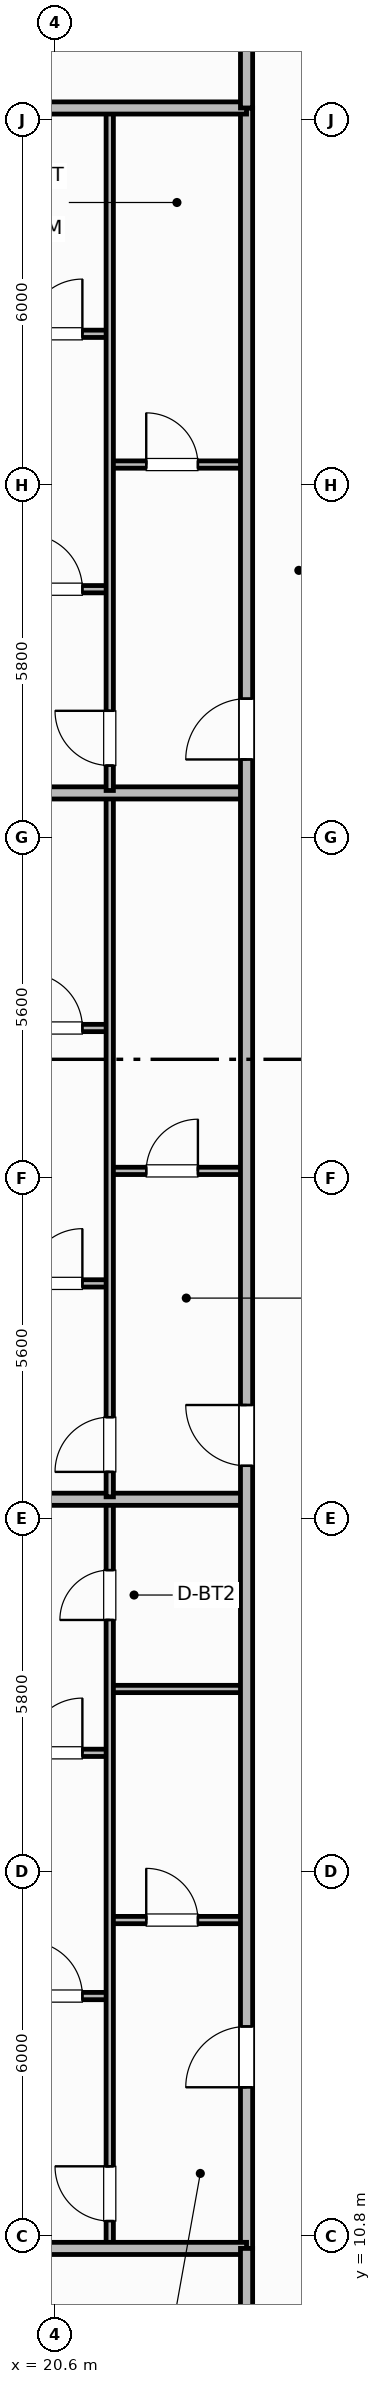
"""IFC4 building model, lengths in metres.
Left out: names, types, materials, properties, quantities, classifications, styles, units other than length and angle.
Written with IfcOpenShell. Run it as: python <this file> out.ifc"""

import sys

from ifc_helpers import new_model, si_unit, direction, frame, frame_2d, origin, place, context, subcontext, project, spatial, rectangle, extrude, element, fill, save


model = new_model("IFC4")
c1 = context("Model", 3, precision=1e-05, world=origin(), true_north=direction((0.0, 1.0)))
c2 = subcontext(c1, "Body", "Model", "MODEL_VIEW")
j1 = project(units=[si_unit("LENGTHUNIT", "METRE"), si_unit("PLANEANGLEUNIT", "RADIAN")], contexts=[c1])
p1 = place(None, origin())
s1 = spatial("IfcSite", under=j1, at=p1, CompositionType="ELEMENT")
p2 = place(p1, origin())
s2 = spatial("IfcBuilding", under=s1, at=p2, CompositionType="ELEMENT")
p3 = place(p2, frame((0.0, 0.0, 106.8)))
s3 = spatial("IfcBuildingStorey", under=s2, at=p3, CompositionType="ELEMENT", Elevation=106.8)
p4 = place(p3, frame((21.5, 16.0, 0.0), z_axis=(0.0, 0.0, 1.0), x_axis=(1.0, 0.0, 0.0)))
e1 = element("IfcWall", 1, at=p4, inside=s3, PredefinedType="PARTITIONING", context=c2, shape_type="SweptSolid", body=[
    extrude(rectangle(XDim=2.25, YDim=0.12, at=frame_2d((1.125, 0.0))), origin(), (0.0, 0.0, 1.0), 2.53),
])
p5 = place(p4, frame((0.6, 0.0, 0.0)))
e2 = element("IfcOpeningElement", 2, at=p5, cuts=e1, PredefinedType="OPENING", context=c2, shape_type="SweptSolid", body=[
    extrude(rectangle(XDim=0.85, YDim=2.1, at=frame_2d((0.425, 1.05))), frame((0.0, 0.07, 0.0), z_axis=(0.0, -1.0, 0.0), x_axis=(1.0, 0.0, 0.0)), (0.0, 0.0, 1.0), 0.14),
])
p6 = place(p3, frame((21.5, 19.8, 0.0), z_axis=(0.0, 0.0, 1.0), x_axis=(1.0, 0.0, 0.0)))
e3 = element("IfcWall", 3, at=p6, inside=s3, PredefinedType="PARTITIONING", context=c2, shape_type="SweptSolid", body=[
    extrude(rectangle(XDim=2.25, YDim=0.12, at=frame_2d((1.125, 0.0))), origin(), (0.0, 0.0, 1.0), 2.53),
])
p7 = place(p3, frame((14.57, 14.75, 0.0), z_axis=(0.0, 0.0, 1.0), x_axis=(1.0, 0.0, 0.0)))
e4 = element("IfcWall", 4, at=p7, inside=s3, PredefinedType="PARTITIONING", context=c2, shape_type="SweptSolid", body=[
    extrude(rectangle(XDim=6.93, YDim=0.12, at=frame_2d((3.465, 0.0))), origin(), (0.0, 0.0, 1.0), 2.53),
])
p8 = place(p7, frame((5.58, 0.0, 0.0)))
e5 = element("IfcOpeningElement", 5, at=p8, cuts=e4, PredefinedType="OPENING", context=c2, shape_type="SweptSolid", body=[
    extrude(rectangle(XDim=0.9, YDim=2.1, at=frame_2d((0.45, 1.05))), frame((0.0, 0.07, 0.0), z_axis=(0.0, -1.0, 0.0), x_axis=(1.0, 0.0, 0.0)), (0.0, 0.0, 1.0), 0.14),
])
p9 = place(p3, frame((14.57, 18.75, 0.0), z_axis=(0.0, 0.0, 1.0), x_axis=(1.0, 0.0, 0.0)))
e6 = element("IfcWall", 6, at=p9, inside=s3, PredefinedType="PARTITIONING", context=c2, shape_type="SweptSolid", body=[
    extrude(rectangle(XDim=6.93, YDim=0.12, at=frame_2d((3.465, 0.0))), origin(), (0.0, 0.0, 1.0), 2.53),
])
p10 = place(p9, frame((5.58, 0.0, 0.0)))
e7 = element("IfcOpeningElement", 7, at=p10, cuts=e6, PredefinedType="OPENING", context=c2, shape_type="SweptSolid", body=[
    extrude(rectangle(XDim=0.9, YDim=2.1, at=frame_2d((0.45, 1.05))), frame((0.0, 0.07, 0.0), z_axis=(0.0, -1.0, 0.0), x_axis=(1.0, 0.0, 0.0)), (0.0, 0.0, 1.0), 0.14),
])
p11 = place(p3, frame((21.5, 10.64, 0.0), z_axis=(0.0, 0.0, 1.0), x_axis=(0.0, 1.0, 0.0)))
e8 = element("IfcWall", 8, at=p11, inside=s3, PredefinedType="PARTITIONING", context=c2, shape_type="SweptSolid", body=[
    extrude(rectangle(XDim=12.24, YDim=0.12, at=frame_2d((6.12, 0.0))), origin(), (0.0, 0.0, 1.0), 2.53),
])
p12 = place(p11, frame((0.41, 0.0, 0.0)))
e9 = element("IfcOpeningElement", 9, at=p12, cuts=e8, PredefinedType="OPENING", context=c2, shape_type="SweptSolid", body=[
    extrude(rectangle(XDim=0.9, YDim=2.1, at=frame_2d((0.45, 1.05))), frame((0.0, 0.07, 0.0), z_axis=(0.0, -1.0, 0.0), x_axis=(1.0, 0.0, 0.0)), (0.0, 0.0, 1.0), 0.14),
])
p13 = place(p11, frame((10.295, 0.0, 0.0)))
e10 = element("IfcOpeningElement", 10, at=p13, cuts=e8, PredefinedType="OPENING", context=c2, shape_type="SweptSolid", body=[
    extrude(rectangle(XDim=0.82, YDim=2.08, at=frame_2d((0.41, 1.04))), frame((0.0, 0.07, 0.0), z_axis=(0.0, -1.0, 0.0), x_axis=(1.0, 0.0, 0.0)), (0.0, 0.0, 1.0), 0.14),
])
p14 = place(p3, frame((14.57, 22.92, 0.0), z_axis=(0.0, 0.0, 1.0), x_axis=(1.0, 0.0, 0.0)))
e11 = element("IfcWall", 11, at=p14, inside=s3, PredefinedType="PARTITIONING", context=c2, shape_type="SweptSolid", body=[
    extrude(rectangle(XDim=9.18, YDim=0.2, at=frame_2d((4.59, 0.0))), origin(), (0.0, 0.0, 1.0), 2.53),
])
p15 = place(p3, frame((21.5, 28.32, 0.0), z_axis=(0.0, 0.0, 1.0), x_axis=(1.0, 0.0, 0.0)))
e12 = element("IfcWall", 12, at=p15, inside=s3, PredefinedType="PARTITIONING", context=c2, shape_type="SweptSolid", body=[
    extrude(rectangle(XDim=2.25, YDim=0.12, at=frame_2d((1.125, 0.0))), origin(), (0.0, 0.0, 1.0), 2.53),
])
p16 = place(p15, frame((0.6, 0.0, 0.0)))
e13 = element("IfcOpeningElement", 13, at=p16, cuts=e12, PredefinedType="OPENING", context=c2, shape_type="SweptSolid", body=[
    extrude(rectangle(XDim=0.85, YDim=2.1, at=frame_2d((0.425, 1.05))), frame((0.0, 0.07, 0.0), z_axis=(0.0, -1.0, 0.0), x_axis=(1.0, 0.0, 0.0)), (0.0, 0.0, 1.0), 0.14),
])
p17 = place(p3, frame((15.434, 26.47, 0.0), z_axis=(0.0, 0.0, 1.0), x_axis=(1.0, 0.0, 0.0)))
e14 = element("IfcWall", 14, at=p17, inside=s3, PredefinedType="PARTITIONING", context=c2, shape_type="SweptSolid", body=[
    extrude(rectangle(XDim=6.066, YDim=0.12, at=frame_2d((3.033, 0.0))), origin(), (0.0, 0.0, 1.0), 2.53),
])
p18 = place(p17, frame((4.716, 0.0, 0.0)))
e15 = element("IfcOpeningElement", 15, at=p18, cuts=e14, PredefinedType="OPENING", context=c2, shape_type="SweptSolid", body=[
    extrude(rectangle(XDim=0.9, YDim=2.1, at=frame_2d((0.45, 1.05))), frame((0.0, 0.07, 0.0), z_axis=(0.0, -1.0, 0.0), x_axis=(1.0, 0.0, 0.0)), (0.0, 0.0, 1.0), 0.14),
])
p19 = place(p3, frame((15.71, 30.67, 0.0), z_axis=(0.0, 0.0, 1.0), x_axis=(1.0, 0.0, 0.0)))
e16 = element("IfcWall", 16, at=p19, inside=s3, PredefinedType="PARTITIONING", context=c2, shape_type="SweptSolid", body=[
    extrude(rectangle(XDim=5.79, YDim=0.12, at=frame_2d((2.895, 0.0))), origin(), (0.0, 0.0, 1.0), 2.53),
])
p20 = place(p19, frame((4.439, 0.0, 0.0)))
e17 = element("IfcOpeningElement", 17, at=p20, cuts=e16, PredefinedType="OPENING", context=c2, shape_type="SweptSolid", body=[
    extrude(rectangle(XDim=0.9, YDim=2.1, at=frame_2d((0.45, 1.05))), frame((0.0, 0.07, 0.0), z_axis=(0.0, -1.0, 0.0), x_axis=(1.0, 0.0, 0.0)), (0.0, 0.0, 1.0), 0.14),
])
p21 = place(p3, frame((21.5, 22.96, 0.0), z_axis=(0.0, 0.0, 1.0), x_axis=(0.0, 1.0, 0.0)))
e18 = element("IfcWall", 18, at=p21, inside=s3, PredefinedType="PARTITIONING", context=c2, shape_type="SweptSolid", body=[
    extrude(rectangle(XDim=11.536, YDim=0.12, at=frame_2d((5.768, 0.0))), origin(), (0.0, 0.0, 1.0), 2.53),
])
p22 = place(p21, frame((0.41, 0.0, 0.0)))
e19 = element("IfcOpeningElement", 19, at=p22, cuts=e18, PredefinedType="OPENING", context=c2, shape_type="SweptSolid", body=[
    extrude(rectangle(XDim=0.9, YDim=2.1, at=frame_2d((0.45, 1.05))), frame((0.0, 0.07, 0.0), z_axis=(0.0, -1.0, 0.0), x_axis=(1.0, 0.0, 0.0)), (0.0, 0.0, 1.0), 0.14),
])
p23 = place(p3, frame((14.57, 34.536, 0.0), z_axis=(0.0, 0.0, 1.0), x_axis=(1.0, 0.0, 0.0)))
e20 = element("IfcWall", 20, at=p23, inside=s3, PredefinedType="PARTITIONING", context=c2, shape_type="SweptSolid", body=[
    extrude(rectangle(XDim=9.18, YDim=0.2, at=frame_2d((4.59, 0.0))), origin(), (0.0, 0.0, 1.0), 2.53),
])
p24 = place(p3, frame((21.5, 39.936, 0.0), z_axis=(0.0, 0.0, 1.0), x_axis=(1.0, 0.0, 0.0)))
e21 = element("IfcWall", 21, at=p24, inside=s3, PredefinedType="PARTITIONING", context=c2, shape_type="SweptSolid", body=[
    extrude(rectangle(XDim=2.25, YDim=0.12, at=frame_2d((1.125, 0.0))), origin(), (0.0, 0.0, 1.0), 2.53),
])
p25 = place(p24, frame((0.6, 0.0, 0.0)))
e22 = element("IfcOpeningElement", 22, at=p25, cuts=e21, PredefinedType="OPENING", context=c2, shape_type="SweptSolid", body=[
    extrude(rectangle(XDim=0.85, YDim=2.1, at=frame_2d((0.425, 1.05))), frame((0.0, 0.07, 0.0), z_axis=(0.0, -1.0, 0.0), x_axis=(1.0, 0.0, 0.0)), (0.0, 0.0, 1.0), 0.14),
])
p26 = place(p3, frame((14.57, 37.886, 0.0), z_axis=(0.0, 0.0, 1.0), x_axis=(1.0, 0.0, 0.0)))
e23 = element("IfcWall", 23, at=p26, inside=s3, PredefinedType="PARTITIONING", context=c2, shape_type="SweptSolid", body=[
    extrude(rectangle(XDim=6.93, YDim=0.12, at=frame_2d((3.465, 0.0))), origin(), (0.0, 0.0, 1.0), 2.53),
])
p27 = place(p26, frame((5.58, 0.0, 0.0)))
e24 = element("IfcOpeningElement", 24, at=p27, cuts=e23, PredefinedType="OPENING", context=c2, shape_type="SweptSolid", body=[
    extrude(rectangle(XDim=0.9, YDim=2.1, at=frame_2d((0.45, 1.05))), frame((0.0, 0.07, 0.0), z_axis=(0.0, -1.0, 0.0), x_axis=(1.0, 0.0, 0.0)), (0.0, 0.0, 1.0), 0.14),
])
p28 = place(p3, frame((14.57, 42.086, 0.0), z_axis=(0.0, 0.0, 1.0), x_axis=(1.0, 0.0, 0.0)))
e25 = element("IfcWall", 25, at=p28, inside=s3, PredefinedType="PARTITIONING", context=c2, shape_type="SweptSolid", body=[
    extrude(rectangle(XDim=6.93, YDim=0.12, at=frame_2d((3.465, 0.0))), origin(), (0.0, 0.0, 1.0), 2.53),
])
p29 = place(p28, frame((5.58, 0.0, 0.0)))
e26 = element("IfcOpeningElement", 26, at=p29, cuts=e25, PredefinedType="OPENING", context=c2, shape_type="SweptSolid", body=[
    extrude(rectangle(XDim=0.9, YDim=2.1, at=frame_2d((0.45, 1.05))), frame((0.0, 0.07, 0.0), z_axis=(0.0, -1.0, 0.0), x_axis=(1.0, 0.0, 0.0)), (0.0, 0.0, 1.0), 0.14),
])
p30 = place(p3, frame((21.5, 34.576, 0.0), z_axis=(0.0, 0.0, 1.0), x_axis=(0.0, 1.0, 0.0)))
e27 = element("IfcWall", 27, at=p30, inside=s3, PredefinedType="PARTITIONING", context=c2, shape_type="SweptSolid", body=[
    extrude(rectangle(XDim=11.184, YDim=0.12, at=frame_2d((5.592, 0.0))), origin(), (0.0, 0.0, 1.0), 2.53),
])
p31 = place(p30, frame((0.41, 0.0, 0.0)))
e28 = element("IfcOpeningElement", 28, at=p31, cuts=e27, PredefinedType="OPENING", context=c2, shape_type="SweptSolid", body=[
    extrude(rectangle(XDim=0.9, YDim=2.1, at=frame_2d((0.45, 1.05))), frame((0.0, 0.07, 0.0), z_axis=(0.0, -1.0, 0.0), x_axis=(1.0, 0.0, 0.0)), (0.0, 0.0, 1.0), 0.14),
])
p32 = place(p3, frame((23.75, 10.6, 0.0), z_axis=(0.0, 0.0, 1.0), x_axis=(0.0, 1.0, 0.0)))
e29 = element("IfcWall", 29, at=p32, inside=s3, PredefinedType="PARTITIONING", context=c2, shape_type="SweptSolid", body=[
    extrude(rectangle(XDim=35.2, YDim=0.2, at=frame_2d((17.6, 0.0))), origin(), (0.0, 0.0, 1.0), 2.53),
])
p33 = place(p32, frame((2.65, 0.0, 0.0)))
e30 = element("IfcOpeningElement", 30, at=p33, cuts=e29, PredefinedType="OPENING", context=c2, shape_type="SweptSolid", body=[
    extrude(rectangle(XDim=1.0, YDim=2.15, at=frame_2d((0.5, 1.075))), frame((0.0, 0.11, 0.0), z_axis=(0.0, -1.0, 0.0), x_axis=(1.0, 0.0, 0.0)), (0.0, 0.0, 1.0), 0.22),
])
p34 = place(p32, frame((12.87, 0.0, 0.0)))
e31 = element("IfcOpeningElement", 31, at=p34, cuts=e29, PredefinedType="OPENING", context=c2, shape_type="SweptSolid", body=[
    extrude(rectangle(XDim=1.0, YDim=2.15, at=frame_2d((0.5, 1.075))), frame((0.0, 0.11, 0.0), z_axis=(0.0, -1.0, 0.0), x_axis=(1.0, 0.0, 0.0)), (0.0, 0.0, 1.0), 0.22),
])
p35 = place(p32, frame((24.486, 0.0, 0.0)))
e32 = element("IfcOpeningElement", 32, at=p35, cuts=e29, PredefinedType="OPENING", context=c2, shape_type="SweptSolid", body=[
    extrude(rectangle(XDim=1.0, YDim=2.15, at=frame_2d((0.5, 1.075))), frame((0.0, 0.11, 0.0), z_axis=(0.0, -1.0, 0.0), x_axis=(1.0, 0.0, 0.0)), (0.0, 0.0, 1.0), 0.22),
])
for number, where, z_axis, x_axis in (
    (33, (14.99, 10.6, 0.0), (0.0, 0.0, 1.0), (1.0, 0.0, 0.0)),
    (34, (14.99, 45.8, 0.0), (0.0, 0.0, 1.0), (1.0, 0.0, 0.0)),
):
    element("IfcWall", number, at=place(p3, frame(where, z_axis=z_axis, x_axis=x_axis)), inside=s3, PredefinedType="PARTITIONING", context=c2, shape_type="SweptSolid", body=[
        extrude(rectangle(XDim=8.76, YDim=0.2, at=frame_2d((4.38, 0.0))), origin(), (0.0, 0.0, 1.0), 2.53),
    ])
p36 = place(p3, frame((23.75, 4.97, 0.0), z_axis=(0.0, 0.0, 1.0), x_axis=(0.0, 1.0, 0.0)))
e35 = element("IfcWall", 35, at=p36, inside=s3, PredefinedType="PARTITIONING", context=c2, shape_type="SweptSolid", body=[
    extrude(rectangle(XDim=5.63, YDim=0.2, at=frame_2d((2.815, 0.0))), origin(), (0.0, 0.0, 1.0), 2.53),
])
p37 = place(p3, frame((23.75, 45.8, 0.0), z_axis=(0.0, 0.0, 1.0), x_axis=(0.0, 1.0, 0.0)))
e36 = element("IfcWall", 36, at=p37, inside=s3, PredefinedType="PARTITIONING", context=c2, shape_type="SweptSolid", body=[
    extrude(rectangle(XDim=5.63, YDim=0.2, at=frame_2d((2.815, 0.0))), origin(), (0.0, 0.0, 1.0), 2.53),
])
p38 = place(p5, origin())
e37 = element("IfcDoor", 37, at=p38, inside=s3, OperationType="SINGLE_SWING_LEFT", PredefinedType="DOOR", context=c2, shape_type="SweptSolid", body=[
    extrude(rectangle(XDim=0.85, YDim=2.1, at=frame_2d((0.425, 1.05))), frame((0.0, 0.025, 0.0), z_axis=(0.0, -1.0, 0.0), x_axis=(1.0, 0.0, 0.0)), (0.0, 0.0, 1.0), 0.05),
])
fill(e2, e37)
p39 = place(p8, origin())
e38 = element("IfcDoor", 38, at=p39, inside=s3, OperationType="SINGLE_SWING_LEFT", PredefinedType="DOOR", context=c2, shape_type="SweptSolid", body=[
    extrude(rectangle(XDim=0.9, YDim=2.1, at=frame_2d((0.45, 1.05))), frame((0.0, 0.025, 0.0), z_axis=(0.0, -1.0, 0.0), x_axis=(1.0, 0.0, 0.0)), (0.0, 0.0, 1.0), 0.05),
])
fill(e5, e38)
p40 = place(p10, origin())
e39 = element("IfcDoor", 39, at=p40, inside=s3, OperationType="SINGLE_SWING_RIGHT", PredefinedType="DOOR", context=c2, shape_type="SweptSolid", body=[
    extrude(rectangle(XDim=0.9, YDim=2.1, at=frame_2d((0.45, 1.05))), frame((0.0, 0.025, 0.0), z_axis=(0.0, -1.0, 0.0), x_axis=(1.0, 0.0, 0.0)), (0.0, 0.0, 1.0), 0.05),
])
fill(e7, e39)
p41 = place(p12, origin())
e40 = element("IfcDoor", 40, at=p41, inside=s3, OperationType="SINGLE_SWING_RIGHT", PredefinedType="DOOR", context=c2, shape_type="SweptSolid", body=[
    extrude(rectangle(XDim=0.9, YDim=2.1, at=frame_2d((0.45, 1.05))), frame((0.0, 0.025, 0.0), z_axis=(0.0, -1.0, 0.0), x_axis=(1.0, 0.0, 0.0)), (0.0, 0.0, 1.0), 0.05),
])
fill(e9, e40)
p42 = place(p13, origin())
e41 = element("IfcDoor", 41, at=p42, inside=s3, OperationType="SINGLE_SWING_LEFT", PredefinedType="DOOR", context=c2, shape_type="SweptSolid", body=[
    extrude(rectangle(XDim=0.82, YDim=2.08, at=frame_2d((0.41, 1.04))), frame((0.0, 0.025, 0.0), z_axis=(0.0, -1.0, 0.0), x_axis=(1.0, 0.0, 0.0)), (0.0, 0.0, 1.0), 0.05),
])
fill(e10, e41)
p43 = place(p16, origin())
e42 = element("IfcDoor", 42, at=p43, inside=s3, OperationType="SINGLE_SWING_RIGHT", PredefinedType="DOOR", context=c2, shape_type="SweptSolid", body=[
    extrude(rectangle(XDim=0.85, YDim=2.1, at=frame_2d((0.425, 1.05))), frame((0.0, 0.025, 0.0), z_axis=(0.0, -1.0, 0.0), x_axis=(1.0, 0.0, 0.0)), (0.0, 0.0, 1.0), 0.05),
])
fill(e13, e42)
p44 = place(p18, origin())
e43 = element("IfcDoor", 43, at=p44, inside=s3, OperationType="SINGLE_SWING_RIGHT", PredefinedType="DOOR", context=c2, shape_type="SweptSolid", body=[
    extrude(rectangle(XDim=0.9, YDim=2.1, at=frame_2d((0.45, 1.05))), frame((0.0, 0.025, 0.0), z_axis=(0.0, -1.0, 0.0), x_axis=(1.0, 0.0, 0.0)), (0.0, 0.0, 1.0), 0.05),
])
fill(e15, e43)
p45 = place(p20, origin())
e44 = element("IfcDoor", 44, at=p45, inside=s3, OperationType="SINGLE_SWING_LEFT", PredefinedType="DOOR", context=c2, shape_type="SweptSolid", body=[
    extrude(rectangle(XDim=0.9, YDim=2.1, at=frame_2d((0.45, 1.05))), frame((0.0, 0.025, 0.0), z_axis=(0.0, -1.0, 0.0), x_axis=(1.0, 0.0, 0.0)), (0.0, 0.0, 1.0), 0.05),
])
fill(e17, e44)
p46 = place(p22, origin())
e45 = element("IfcDoor", 45, at=p46, inside=s3, OperationType="SINGLE_SWING_LEFT", PredefinedType="DOOR", context=c2, shape_type="SweptSolid", body=[
    extrude(rectangle(XDim=0.9, YDim=2.1, at=frame_2d((0.45, 1.05))), frame((0.0, 0.025, 0.0), z_axis=(0.0, -1.0, 0.0), x_axis=(1.0, 0.0, 0.0)), (0.0, 0.0, 1.0), 0.05),
])
fill(e19, e45)
p47 = place(p25, origin())
e46 = element("IfcDoor", 46, at=p47, inside=s3, OperationType="SINGLE_SWING_LEFT", PredefinedType="DOOR", context=c2, shape_type="SweptSolid", body=[
    extrude(rectangle(XDim=0.85, YDim=2.1, at=frame_2d((0.425, 1.05))), frame((0.0, 0.025, 0.0), z_axis=(0.0, -1.0, 0.0), x_axis=(1.0, 0.0, 0.0)), (0.0, 0.0, 1.0), 0.05),
])
fill(e22, e46)
p48 = place(p27, origin())
e47 = element("IfcDoor", 47, at=p48, inside=s3, OperationType="SINGLE_SWING_LEFT", PredefinedType="DOOR", context=c2, shape_type="SweptSolid", body=[
    extrude(rectangle(XDim=0.9, YDim=2.1, at=frame_2d((0.45, 1.05))), frame((0.0, 0.025, 0.0), z_axis=(0.0, -1.0, 0.0), x_axis=(1.0, 0.0, 0.0)), (0.0, 0.0, 1.0), 0.05),
])
fill(e24, e47)
p49 = place(p29, origin())
e48 = element("IfcDoor", 48, at=p49, inside=s3, OperationType="SINGLE_SWING_RIGHT", PredefinedType="DOOR", context=c2, shape_type="SweptSolid", body=[
    extrude(rectangle(XDim=0.9, YDim=2.1, at=frame_2d((0.45, 1.05))), frame((0.0, 0.025, 0.0), z_axis=(0.0, -1.0, 0.0), x_axis=(1.0, 0.0, 0.0)), (0.0, 0.0, 1.0), 0.05),
])
fill(e26, e48)
p50 = place(p31, origin())
e49 = element("IfcDoor", 49, at=p50, inside=s3, OperationType="SINGLE_SWING_RIGHT", PredefinedType="DOOR", context=c2, shape_type="SweptSolid", body=[
    extrude(rectangle(XDim=0.9, YDim=2.1, at=frame_2d((0.45, 1.05))), frame((0.0, 0.025, 0.0), z_axis=(0.0, -1.0, 0.0), x_axis=(1.0, 0.0, 0.0)), (0.0, 0.0, 1.0), 0.05),
])
fill(e28, e49)
p51 = place(p33, origin())
e50 = element("IfcDoor", 50, at=p51, inside=s3, OperationType="SINGLE_SWING_LEFT", PredefinedType="DOOR", context=c2, shape_type="SweptSolid", body=[
    extrude(rectangle(XDim=1.0, YDim=2.15, at=frame_2d((0.5, 1.075))), frame((0.0, 0.025, 0.0), z_axis=(0.0, -1.0, 0.0), x_axis=(1.0, 0.0, 0.0)), (0.0, 0.0, 1.0), 0.05),
])
fill(e30, e50)
p52 = place(p34, origin())
e51 = element("IfcDoor", 51, at=p52, inside=s3, OperationType="SINGLE_SWING_RIGHT", PredefinedType="DOOR", context=c2, shape_type="SweptSolid", body=[
    extrude(rectangle(XDim=1.0, YDim=2.15, at=frame_2d((0.5, 1.075))), frame((0.0, 0.025, 0.0), z_axis=(0.0, -1.0, 0.0), x_axis=(1.0, 0.0, 0.0)), (0.0, 0.0, 1.0), 0.05),
])
fill(e31, e51)
p53 = place(p35, origin())
e52 = element("IfcDoor", 52, at=p53, inside=s3, OperationType="SINGLE_SWING_LEFT", PredefinedType="DOOR", context=c2, shape_type="SweptSolid", body=[
    extrude(rectangle(XDim=1.0, YDim=2.15, at=frame_2d((0.5, 1.075))), frame((0.0, 0.025, 0.0), z_axis=(0.0, -1.0, 0.0), x_axis=(1.0, 0.0, 0.0)), (0.0, 0.0, 1.0), 0.05),
])
fill(e32, e52)
save(model, sys.argv[1])
